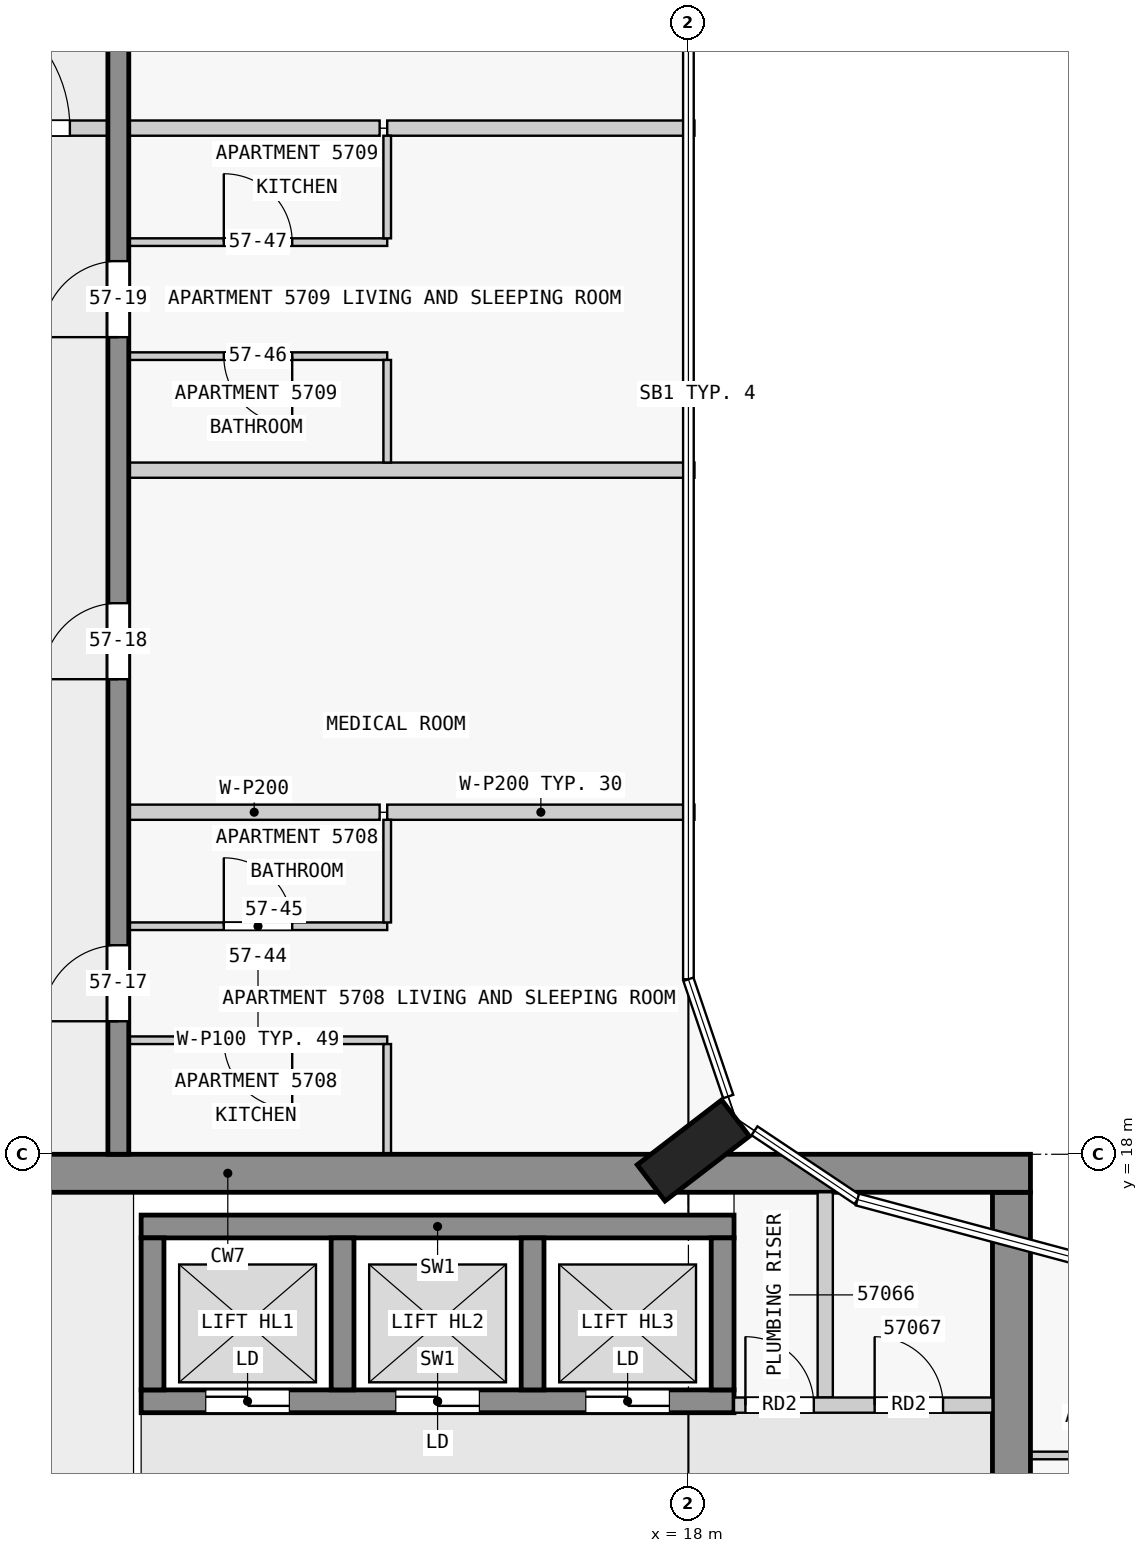
"""IFC4 building model, lengths in metres.
Left out: names, types, materials, properties, quantities, classifications, styles, units other than length and angle.
Written with IfcOpenShell. Run it as: python <this file> out.ifc"""

import sys

from ifc_helpers import new_model, si_unit, direction, frame, frame_2d, origin, origin_2d, place, context, subcontext, project, spatial, rectangle, extrude, element, fill, save


model = new_model("IFC4")
c1 = context("Model", 3, precision=1e-05, world=origin(), true_north=direction((0.0, 1.0)))
c2 = subcontext(c1, "Body", "Model", "MODEL_VIEW")
j1 = project(units=[si_unit("LENGTHUNIT", "METRE"), si_unit("PLANEANGLEUNIT", "RADIAN")], contexts=[c1])
p1 = place(None, origin())
s1 = spatial("IfcSite", under=j1, at=p1, CompositionType="ELEMENT")
p2 = place(p1, origin())
s2 = spatial("IfcBuilding", under=s1, at=p2, CompositionType="ELEMENT")
p3 = place(p2, frame((0.0, 0.0, 218.9)))
s3 = spatial("IfcBuildingStorey", under=s2, at=p3, CompositionType="ELEMENT", Elevation=218.9)
p4 = place(p3, frame((18.065, 18.05, 0.0), z_axis=(0.0, 0.0, 1.0), x_axis=(-0.608810846443, 0.793315418515, 0.0)))
e1 = element("IfcColumn", 1, at=p4, inside=s3, PredefinedType="COLUMN", context=c2, shape_type="SweptSolid", body=[
    extrude(rectangle(XDim=0.6, YDim=1.4, at=origin_2d()), origin(), (0.0, 0.0, 1.0), 3.5),
])
p5 = place(p3, frame((1.38, 17.75, 0.0), z_axis=(0.0, 0.0, 1.0), x_axis=(1.0, 0.0, 0.0)))
e2 = element("IfcWall", 2, at=p5, inside=s3, PredefinedType="SHEAR", context=c2, shape_type="SweptSolid", body=[
    extrude(rectangle(XDim=21.12, YDim=0.5, at=frame_2d((10.56, 0.0))), origin(), (0.0, 0.0, 1.0), 3.25),
])
p6 = place(p5, frame((6.3, 0.0, 0.0)))
e3 = element("IfcOpeningElement", 3, at=p6, cuts=e2, PredefinedType="OPENING", context=c2, shape_type="SweptSolid", body=[
    extrude(rectangle(XDim=1.8, YDim=2.1, at=frame_2d((0.9, 1.05))), frame((0.0, 0.26, 0.0), z_axis=(0.0, -1.0, 0.0), x_axis=(1.0, 0.0, 0.0)), (0.0, 0.0, 1.0), 0.52),
])
p7 = place(p3, frame((22.25, 2.5, 0.0), z_axis=(0.0, 0.0, 1.0), x_axis=(0.0, 1.0, 0.0)))
e4 = element("IfcWall", 4, at=p7, inside=s3, PredefinedType="SHEAR", context=c2, shape_type="SweptSolid", body=[
    extrude(rectangle(XDim=15.0, YDim=0.5, at=frame_2d((7.5, 0.0))), origin(), (0.0, 0.0, 1.0), 3.25),
])
p8 = place(p7, frame((5.6, 0.0, 0.0)))
e5 = element("IfcOpeningElement", 5, at=p8, cuts=e4, PredefinedType="OPENING", context=c2, shape_type="SweptSolid", body=[
    extrude(rectangle(XDim=1.8, YDim=2.1, at=frame_2d((0.9, 1.05))), frame((0.0, 0.26, 0.0), z_axis=(0.0, -1.0, 0.0), x_axis=(1.0, 0.0, 0.0)), (0.0, 0.0, 1.0), 0.52),
])
p9 = place(p3, frame((10.8, 17.05, 0.0), z_axis=(0.0, 0.0, 1.0), x_axis=(1.0, 0.0, 0.0)))
e6 = element("IfcWall", 6, at=p9, inside=s3, PredefinedType="SHEAR", context=c2, shape_type="SweptSolid", body=[
    extrude(rectangle(XDim=7.8, YDim=0.3, at=frame_2d((3.9, 0.0))), origin(), (0.0, 0.0, 1.0), 3.25),
])
p10 = place(p3, frame((10.8, 14.75, 0.0), z_axis=(0.0, 0.0, 1.0), x_axis=(1.0, 0.0, 0.0)))
e7 = element("IfcWall", 7, at=p10, inside=s3, PredefinedType="SHEAR", context=c2, shape_type="SweptSolid", body=[
    extrude(rectangle(XDim=7.8, YDim=0.3, at=frame_2d((3.9, 0.0))), origin(), (0.0, 0.0, 1.0), 3.25),
])
p11 = place(p10, frame((0.85, 0.0, 0.0)))
e8 = element("IfcOpeningElement", 8, at=p11, cuts=e7, PredefinedType="OPENING", context=c2, shape_type="SweptSolid", body=[
    extrude(rectangle(XDim=1.1, YDim=2.1, at=frame_2d((0.55, 1.05))), frame((0.0, 0.16, 0.0), z_axis=(0.0, -1.0, 0.0), x_axis=(1.0, 0.0, 0.0)), (0.0, 0.0, 1.0), 0.32),
])
p12 = place(p10, frame((3.35, 0.0, 0.0)))
e9 = element("IfcOpeningElement", 9, at=p12, cuts=e7, PredefinedType="OPENING", context=c2, shape_type="SweptSolid", body=[
    extrude(rectangle(XDim=1.1, YDim=2.1, at=frame_2d((0.55, 1.05))), frame((0.0, 0.16, 0.0), z_axis=(0.0, -1.0, 0.0), x_axis=(1.0, 0.0, 0.0)), (0.0, 0.0, 1.0), 0.32),
])
p13 = place(p10, frame((5.85, 0.0, 0.0)))
e10 = element("IfcOpeningElement", 10, at=p13, cuts=e7, PredefinedType="OPENING", context=c2, shape_type="SweptSolid", body=[
    extrude(rectangle(XDim=1.1, YDim=2.1, at=frame_2d((0.55, 1.05))), frame((0.0, 0.16, 0.0), z_axis=(0.0, -1.0, 0.0), x_axis=(1.0, 0.0, 0.0)), (0.0, 0.0, 1.0), 0.32),
])
for number, where, z_axis, x_axis in (
    (11, (10.95, 14.9, 0.0), (0.0, 0.0, 1.0), (0.0, 1.0, 0.0)),
    (12, (13.45, 14.9, 0.0), (0.0, 0.0, 1.0), (0.0, 1.0, 0.0)),
    (13, (15.95, 14.9, 0.0), (0.0, 0.0, 1.0), (0.0, 1.0, 0.0)),
    (14, (18.45, 14.9, 0.0), (0.0, 0.0, 1.0), (0.0, 1.0, 0.0)),
):
    element("IfcWall", number, at=place(p3, frame(where, z_axis=z_axis, x_axis=x_axis)), inside=s3, PredefinedType="SHEAR", context=c2, shape_type="SweptSolid", body=[
        extrude(rectangle(XDim=2.0, YDim=0.3, at=frame_2d((1.0, 0.0))), origin(), (0.0, 0.0, 1.0), 3.25),
    ])
p14 = place(p3, frame((10.5, 18.0, 0.0), z_axis=(0.0, 0.0, 1.0), x_axis=(0.0, 1.0, 0.0)))
e15 = element("IfcWall", 15, at=p14, inside=s3, PredefinedType="SHEAR", context=c2, shape_type="SweptSolid", body=[
    extrude(rectangle(XDim=27.0, YDim=0.275, at=frame_2d((13.5, 0.0))), origin(), (0.0, 0.0, 1.0), 3.25),
])
p15 = place(p14, frame((1.75, 0.0, 0.0)))
e16 = element("IfcOpeningElement", 16, at=p15, cuts=e15, PredefinedType="OPENING", context=c2, shape_type="SweptSolid", body=[
    extrude(rectangle(XDim=1.0, YDim=2.1, at=frame_2d((0.5, 1.05))), frame((0.0, 0.147, 0.0), z_axis=(0.0, -1.0, 0.0), x_axis=(1.0, 0.0, 0.0)), (0.0, 0.0, 1.0), 0.295),
])
p16 = place(p14, frame((6.25, 0.0, 0.0)))
e17 = element("IfcOpeningElement", 17, at=p16, cuts=e15, PredefinedType="OPENING", context=c2, shape_type="SweptSolid", body=[
    extrude(rectangle(XDim=1.0, YDim=2.1, at=frame_2d((0.5, 1.05))), frame((0.0, 0.147, 0.0), z_axis=(0.0, -1.0, 0.0), x_axis=(1.0, 0.0, 0.0)), (0.0, 0.0, 1.0), 0.295),
])
p17 = place(p14, frame((10.75, 0.0, 0.0)))
e18 = element("IfcOpeningElement", 18, at=p17, cuts=e15, PredefinedType="OPENING", context=c2, shape_type="SweptSolid", body=[
    extrude(rectangle(XDim=1.0, YDim=2.1, at=frame_2d((0.5, 1.05))), frame((0.0, 0.147, 0.0), z_axis=(0.0, -1.0, 0.0), x_axis=(1.0, 0.0, 0.0)), (0.0, 0.0, 1.0), 0.295),
])
p18 = place(p14, frame((15.25, 0.0, 0.0)))
e19 = element("IfcOpeningElement", 19, at=p18, cuts=e15, PredefinedType="OPENING", context=c2, shape_type="SweptSolid", body=[
    extrude(rectangle(XDim=1.0, YDim=2.1, at=frame_2d((0.5, 1.05))), frame((0.0, 0.147, 0.0), z_axis=(0.0, -1.0, 0.0), x_axis=(1.0, 0.0, 0.0)), (0.0, 0.0, 1.0), 0.295),
])
p19 = place(p14, frame((21.35, 0.0, 0.0)))
e20 = element("IfcOpeningElement", 20, at=p19, cuts=e15, PredefinedType="OPENING", context=c2, shape_type="SweptSolid", body=[
    extrude(rectangle(XDim=1.0, YDim=2.1, at=frame_2d((0.5, 1.05))), frame((0.0, 0.147, 0.0), z_axis=(0.0, -1.0, 0.0), x_axis=(1.0, 0.0, 0.0)), (0.0, 0.0, 1.0), 0.295),
])
p20 = place(p3, frame((18.6, 14.7, 0.0), z_axis=(0.0, 0.0, 1.0), x_axis=(1.0, 0.0, 0.0)))
e21 = element("IfcWall", 21, at=p20, inside=s3, PredefinedType="PARTITIONING", context=c2, shape_type="SweptSolid", body=[
    extrude(rectangle(XDim=3.4, YDim=0.2, at=frame_2d((1.7, 0.0))), origin(), (0.0, 0.0, 1.0), 3.25),
])
p21 = place(p20, frame((0.15, 0.0, 0.0)))
e22 = element("IfcOpeningElement", 22, at=p21, cuts=e21, PredefinedType="OPENING", context=c2, shape_type="SweptSolid", body=[
    extrude(rectangle(XDim=0.9, YDim=2.1, at=frame_2d((0.45, 1.05))), frame((0.0, 0.11, 0.0), z_axis=(0.0, -1.0, 0.0), x_axis=(1.0, 0.0, 0.0)), (0.0, 0.0, 1.0), 0.22),
])
p22 = place(p20, frame((1.85, 0.0, 0.0)))
e23 = element("IfcOpeningElement", 23, at=p22, cuts=e21, PredefinedType="OPENING", context=c2, shape_type="SweptSolid", body=[
    extrude(rectangle(XDim=0.9, YDim=2.1, at=frame_2d((0.45, 1.05))), frame((0.0, 0.11, 0.0), z_axis=(0.0, -1.0, 0.0), x_axis=(1.0, 0.0, 0.0)), (0.0, 0.0, 1.0), 0.22),
])
p23 = place(p3, frame((19.8, 14.8, 0.0), z_axis=(0.0, 0.0, 1.0), x_axis=(0.0, 1.0, 0.0)))
e24 = element("IfcWall", 24, at=p23, inside=s3, PredefinedType="PARTITIONING", context=c2, shape_type="SweptSolid", body=[
    extrude(rectangle(XDim=2.7, YDim=0.2, at=frame_2d((1.35, 0.0))), origin(), (0.0, 0.0, 1.0), 3.25),
])
p24 = place(p3, frame((23.95, 14.038, 0.0), z_axis=(0.0, 0.0, 1.0), x_axis=(-1.0, 0.0, 0.0)))
e25 = element("IfcWall", 25, at=p24, inside=s3, PredefinedType="PARTITIONING", context=c2, shape_type="SweptSolid", body=[
    extrude(rectangle(XDim=1.45, YDim=0.1, at=frame_2d((0.725, 0.0))), origin(), (0.0, 0.0, 1.0), 3.25),
])
p25 = place(p3, frame((14.038, 19.5, 0.0), z_axis=(0.0, 0.0, 1.0), x_axis=(-1.0, 0.0, 0.0)))
e26 = element("IfcWall", 26, at=p25, inside=s3, PredefinedType="PARTITIONING", context=c2, shape_type="SweptSolid", body=[
    extrude(rectangle(XDim=3.4, YDim=0.1, at=frame_2d((1.7, 0.0))), origin(), (0.0, 0.0, 1.0), 3.25),
])
p26 = place(p25, frame((1.25, 0.0, 0.0)))
e27 = element("IfcOpeningElement", 27, at=p26, cuts=e26, PredefinedType="OPENING", context=c2, shape_type="SweptSolid", body=[
    extrude(rectangle(XDim=0.9, YDim=2.1, at=frame_2d((0.45, 1.05))), frame((0.0, 0.06, 0.0), z_axis=(0.0, -1.0, 0.0), x_axis=(1.0, 0.0, 0.0)), (0.0, 0.0, 1.0), 0.12),
])
p27 = place(p3, frame((10.637, 21.0, 0.0), z_axis=(0.0, 0.0, 1.0), x_axis=(1.0, 0.0, 0.0)))
e28 = element("IfcWall", 28, at=p27, inside=s3, PredefinedType="PARTITIONING", context=c2, shape_type="SweptSolid", body=[
    extrude(rectangle(XDim=3.4, YDim=0.1, at=frame_2d((1.7, 0.0))), origin(), (0.0, 0.0, 1.0), 3.25),
])
p28 = place(p27, frame((1.25, 0.0, 0.0)))
e29 = element("IfcOpeningElement", 29, at=p28, cuts=e28, PredefinedType="OPENING", context=c2, shape_type="SweptSolid", body=[
    extrude(rectangle(XDim=0.9, YDim=2.1, at=frame_2d((0.45, 1.05))), frame((0.0, 0.06, 0.0), z_axis=(0.0, -1.0, 0.0), x_axis=(1.0, 0.0, 0.0)), (0.0, 0.0, 1.0), 0.12),
])
p29 = place(p3, frame((13.938, 22.5, 0.0), z_axis=(0.0, 0.0, 1.0), x_axis=(-1.0, 0.0, 0.0)))
e30 = element("IfcWall", 30, at=p29, inside=s3, PredefinedType="PARTITIONING", context=c2, shape_type="SweptSolid", body=[
    extrude(rectangle(XDim=3.3, YDim=0.2, at=frame_2d((1.65, 0.0))), origin(), (0.0, 0.0, 1.0), 3.25),
])
p30 = place(p3, frame((14.038, 22.5, 0.0), z_axis=(0.0, 0.0, 1.0), x_axis=(1.0, 0.0, 0.0)))
e31 = element("IfcWall", 31, at=p30, inside=s3, PredefinedType="PARTITIONING", context=c2, shape_type="SweptSolid", body=[
    extrude(rectangle(XDim=4.042, YDim=0.2, at=frame_2d((2.021, 0.0))), origin(), (0.0, 0.0, 1.0), 3.25),
])
p31 = place(p3, frame((18.08, 27.0, 0.0), z_axis=(0.0, 0.0, 1.0), x_axis=(-1.0, 0.0, 0.0)))
e32 = element("IfcWall", 32, at=p31, inside=s3, PredefinedType="PARTITIONING", context=c2, shape_type="SweptSolid", body=[
    extrude(rectangle(XDim=7.443, YDim=0.2, at=frame_2d((3.721, 0.0))), origin(), (0.0, 0.0, 1.0), 3.25),
])
p32 = place(p3, frame((14.038, 28.5, 0.0), z_axis=(0.0, 0.0, 1.0), x_axis=(-1.0, 0.0, 0.0)))
e33 = element("IfcWall", 33, at=p32, inside=s3, PredefinedType="PARTITIONING", context=c2, shape_type="SweptSolid", body=[
    extrude(rectangle(XDim=3.4, YDim=0.1, at=frame_2d((1.7, 0.0))), origin(), (0.0, 0.0, 1.0), 3.25),
])
p33 = place(p32, frame((1.25, 0.0, 0.0)))
e34 = element("IfcOpeningElement", 34, at=p33, cuts=e33, PredefinedType="OPENING", context=c2, shape_type="SweptSolid", body=[
    extrude(rectangle(XDim=0.9, YDim=2.1, at=frame_2d((0.45, 1.05))), frame((0.0, 0.06, 0.0), z_axis=(0.0, -1.0, 0.0), x_axis=(1.0, 0.0, 0.0)), (0.0, 0.0, 1.0), 0.12),
])
p34 = place(p3, frame((10.637, 30.0, 0.0), z_axis=(0.0, 0.0, 1.0), x_axis=(1.0, 0.0, 0.0)))
e35 = element("IfcWall", 35, at=p34, inside=s3, PredefinedType="PARTITIONING", context=c2, shape_type="SweptSolid", body=[
    extrude(rectangle(XDim=3.4, YDim=0.1, at=frame_2d((1.7, 0.0))), origin(), (0.0, 0.0, 1.0), 3.25),
])
p35 = place(p34, frame((1.25, 0.0, 0.0)))
e36 = element("IfcOpeningElement", 36, at=p35, cuts=e35, PredefinedType="OPENING", context=c2, shape_type="SweptSolid", body=[
    extrude(rectangle(XDim=0.9, YDim=2.1, at=frame_2d((0.45, 1.05))), frame((0.0, 0.06, 0.0), z_axis=(0.0, -1.0, 0.0), x_axis=(1.0, 0.0, 0.0)), (0.0, 0.0, 1.0), 0.12),
])
p36 = place(p3, frame((13.938, 31.5, 0.0), z_axis=(0.0, 0.0, 1.0), x_axis=(-1.0, 0.0, 0.0)))
e37 = element("IfcWall", 37, at=p36, inside=s3, PredefinedType="PARTITIONING", context=c2, shape_type="SweptSolid", body=[
    extrude(rectangle(XDim=3.3, YDim=0.2, at=frame_2d((1.65, 0.0))), origin(), (0.0, 0.0, 1.0), 3.25),
])
p37 = place(p3, frame((14.038, 31.5, 0.0), z_axis=(0.0, 0.0, 1.0), x_axis=(1.0, 0.0, 0.0)))
e38 = element("IfcWall", 38, at=p37, inside=s3, PredefinedType="PARTITIONING", context=c2, shape_type="SweptSolid", body=[
    extrude(rectangle(XDim=4.042, YDim=0.2, at=frame_2d((2.021, 0.0))), origin(), (0.0, 0.0, 1.0), 3.25),
])
p38 = place(p3, frame((14.038, 18.0, 0.0), z_axis=(0.0, 0.0, 1.0), x_axis=(0.0, 1.0, 0.0)))
e39 = element("IfcWall", 39, at=p38, inside=s3, PredefinedType="PARTITIONING", context=c2, shape_type="SweptSolid", body=[
    extrude(rectangle(XDim=1.45, YDim=0.1, at=frame_2d((0.725, 0.0))), origin(), (0.0, 0.0, 1.0), 3.25),
])
for number, where, z_axis, x_axis in (
    (40, (14.038, 21.05, 0.0), (0.0, 0.0, 1.0), (0.0, 1.0, 0.0)),
    (41, (14.038, 27.1, 0.0), (0.0, 0.0, 1.0), (0.0, 1.0, 0.0)),
    (42, (14.038, 30.05, 0.0), (0.0, 0.0, 1.0), (0.0, 1.0, 0.0)),
):
    element("IfcWall", number, at=place(p3, frame(where, z_axis=z_axis, x_axis=x_axis)), inside=s3, PredefinedType="PARTITIONING", context=c2, shape_type="SweptSolid", body=[
        extrude(rectangle(XDim=1.35, YDim=0.1, at=frame_2d((0.675, 0.0))), origin(), (0.0, 0.0, 1.0), 3.25),
    ])
p39 = place(p3, frame((7.462, 31.5, 0.0), z_axis=(0.0, 0.0, 1.0), x_axis=(1.0, 0.0, 0.0)))
e43 = element("IfcWall", 43, at=p39, inside=s3, PredefinedType="PARTITIONING", context=c2, shape_type="SweptSolid", body=[
    extrude(rectangle(XDim=3.075, YDim=0.2, at=frame_2d((1.538, 0.0))), origin(), (0.0, 0.0, 1.0), 3.25),
])
p40 = place(p39, frame((0.6, 0.0, 0.0)))
e44 = element("IfcOpeningElement", 44, at=p40, cuts=e43, PredefinedType="OPENING", context=c2, shape_type="SweptSolid", body=[
    extrude(rectangle(XDim=1.8, YDim=2.1, at=frame_2d((0.9, 1.05))), frame((0.0, 0.11, 0.0), z_axis=(0.0, -1.0, 0.0), x_axis=(1.0, 0.0, 0.0)), (0.0, 0.0, 1.0), 0.22),
])
p41 = place(p11, origin())
e45 = element("IfcDoor", 45, at=p41, inside=s3, OperationType="DOUBLE_DOOR_SLIDING", PredefinedType="DOOR", context=c2, shape_type="SweptSolid", body=[
    extrude(rectangle(XDim=1.1, YDim=2.1, at=frame_2d((0.55, 1.05))), frame((0.0, 0.025, 0.0), z_axis=(0.0, -1.0, 0.0), x_axis=(1.0, 0.0, 0.0)), (0.0, 0.0, 1.0), 0.05),
])
fill(e8, e45)
p42 = place(p12, origin())
e46 = element("IfcDoor", 46, at=p42, inside=s3, OperationType="DOUBLE_DOOR_SLIDING", PredefinedType="DOOR", context=c2, shape_type="SweptSolid", body=[
    extrude(rectangle(XDim=1.1, YDim=2.1, at=frame_2d((0.55, 1.05))), frame((0.0, 0.025, 0.0), z_axis=(0.0, -1.0, 0.0), x_axis=(1.0, 0.0, 0.0)), (0.0, 0.0, 1.0), 0.05),
])
fill(e9, e46)
p43 = place(p13, origin())
e47 = element("IfcDoor", 47, at=p43, inside=s3, OperationType="DOUBLE_DOOR_SLIDING", PredefinedType="DOOR", context=c2, shape_type="SweptSolid", body=[
    extrude(rectangle(XDim=1.1, YDim=2.1, at=frame_2d((0.55, 1.05))), frame((0.0, 0.025, 0.0), z_axis=(0.0, -1.0, 0.0), x_axis=(1.0, 0.0, 0.0)), (0.0, 0.0, 1.0), 0.05),
])
fill(e10, e47)
p44 = place(p21, origin())
e48 = element("IfcDoor", 48, at=p44, inside=s3, OperationType="SINGLE_SWING_LEFT", PredefinedType="DOOR", context=c2, shape_type="SweptSolid", body=[
    extrude(rectangle(XDim=0.9, YDim=2.1, at=frame_2d((0.45, 1.05))), frame((0.0, 0.025, 0.0), z_axis=(0.0, -1.0, 0.0), x_axis=(1.0, 0.0, 0.0)), (0.0, 0.0, 1.0), 0.05),
])
fill(e22, e48)
p45 = place(p22, origin())
e49 = element("IfcDoor", 49, at=p45, inside=s3, OperationType="SINGLE_SWING_LEFT", PredefinedType="DOOR", context=c2, shape_type="SweptSolid", body=[
    extrude(rectangle(XDim=0.9, YDim=2.1, at=frame_2d((0.45, 1.05))), frame((0.0, 0.025, 0.0), z_axis=(0.0, -1.0, 0.0), x_axis=(1.0, 0.0, 0.0)), (0.0, 0.0, 1.0), 0.05),
])
fill(e23, e49)
p46 = place(p15, origin())
e50 = element("IfcDoor", 50, at=p46, inside=s3, OperationType="SINGLE_SWING_LEFT", PredefinedType="DOOR", context=c2, shape_type="SweptSolid", body=[
    extrude(rectangle(XDim=1.0, YDim=2.1, at=frame_2d((0.5, 1.05))), frame((0.0, 0.025, 0.0), z_axis=(0.0, -1.0, 0.0), x_axis=(1.0, 0.0, 0.0)), (0.0, 0.0, 1.0), 0.05),
])
fill(e16, e50)
p47 = place(p16, origin())
e51 = element("IfcDoor", 51, at=p47, inside=s3, OperationType="SINGLE_SWING_LEFT", PredefinedType="DOOR", context=c2, shape_type="SweptSolid", body=[
    extrude(rectangle(XDim=1.0, YDim=2.1, at=frame_2d((0.5, 1.05))), frame((0.0, 0.025, 0.0), z_axis=(0.0, -1.0, 0.0), x_axis=(1.0, 0.0, 0.0)), (0.0, 0.0, 1.0), 0.05),
])
fill(e17, e51)
p48 = place(p17, origin())
e52 = element("IfcDoor", 52, at=p48, inside=s3, OperationType="SINGLE_SWING_LEFT", PredefinedType="DOOR", context=c2, shape_type="SweptSolid", body=[
    extrude(rectangle(XDim=1.0, YDim=2.1, at=frame_2d((0.5, 1.05))), frame((0.0, 0.025, 0.0), z_axis=(0.0, -1.0, 0.0), x_axis=(1.0, 0.0, 0.0)), (0.0, 0.0, 1.0), 0.05),
])
fill(e18, e52)
p49 = place(p40, origin())
e53 = element("IfcDoor", 53, at=p49, inside=s3, OperationType="SINGLE_SWING_LEFT", PredefinedType="DOOR", context=c2, shape_type="SweptSolid", body=[
    extrude(rectangle(XDim=1.8, YDim=2.1, at=frame_2d((0.9, 1.05))), frame((0.0, 0.025, 0.0), z_axis=(0.0, -1.0, 0.0), x_axis=(1.0, 0.0, 0.0)), (0.0, 0.0, 1.0), 0.05),
])
fill(e44, e53)
p50 = place(p26, origin())
e54 = element("IfcDoor", 54, at=p50, inside=s3, OperationType="SINGLE_SWING_LEFT", PredefinedType="DOOR", context=c2, shape_type="SweptSolid", body=[
    extrude(rectangle(XDim=0.9, YDim=2.1, at=frame_2d((0.45, 1.05))), frame((0.0, 0.025, 0.0), z_axis=(0.0, -1.0, 0.0), x_axis=(1.0, 0.0, 0.0)), (0.0, 0.0, 1.0), 0.05),
])
fill(e27, e54)
p51 = place(p28, origin())
e55 = element("IfcDoor", 55, at=p51, inside=s3, OperationType="SINGLE_SWING_LEFT", PredefinedType="DOOR", context=c2, shape_type="SweptSolid", body=[
    extrude(rectangle(XDim=0.9, YDim=2.1, at=frame_2d((0.45, 1.05))), frame((0.0, 0.025, 0.0), z_axis=(0.0, -1.0, 0.0), x_axis=(1.0, 0.0, 0.0)), (0.0, 0.0, 1.0), 0.05),
])
fill(e29, e55)
p52 = place(p33, origin())
e56 = element("IfcDoor", 56, at=p52, inside=s3, OperationType="SINGLE_SWING_LEFT", PredefinedType="DOOR", context=c2, shape_type="SweptSolid", body=[
    extrude(rectangle(XDim=0.9, YDim=2.1, at=frame_2d((0.45, 1.05))), frame((0.0, 0.025, 0.0), z_axis=(0.0, -1.0, 0.0), x_axis=(1.0, 0.0, 0.0)), (0.0, 0.0, 1.0), 0.05),
])
fill(e34, e56)
p53 = place(p35, origin())
e57 = element("IfcDoor", 57, at=p53, inside=s3, OperationType="SINGLE_SWING_LEFT", PredefinedType="DOOR", context=c2, shape_type="SweptSolid", body=[
    extrude(rectangle(XDim=0.9, YDim=2.1, at=frame_2d((0.45, 1.05))), frame((0.0, 0.025, 0.0), z_axis=(0.0, -1.0, 0.0), x_axis=(1.0, 0.0, 0.0)), (0.0, 0.0, 1.0), 0.05),
])
fill(e36, e57)
save(model, sys.argv[1])
